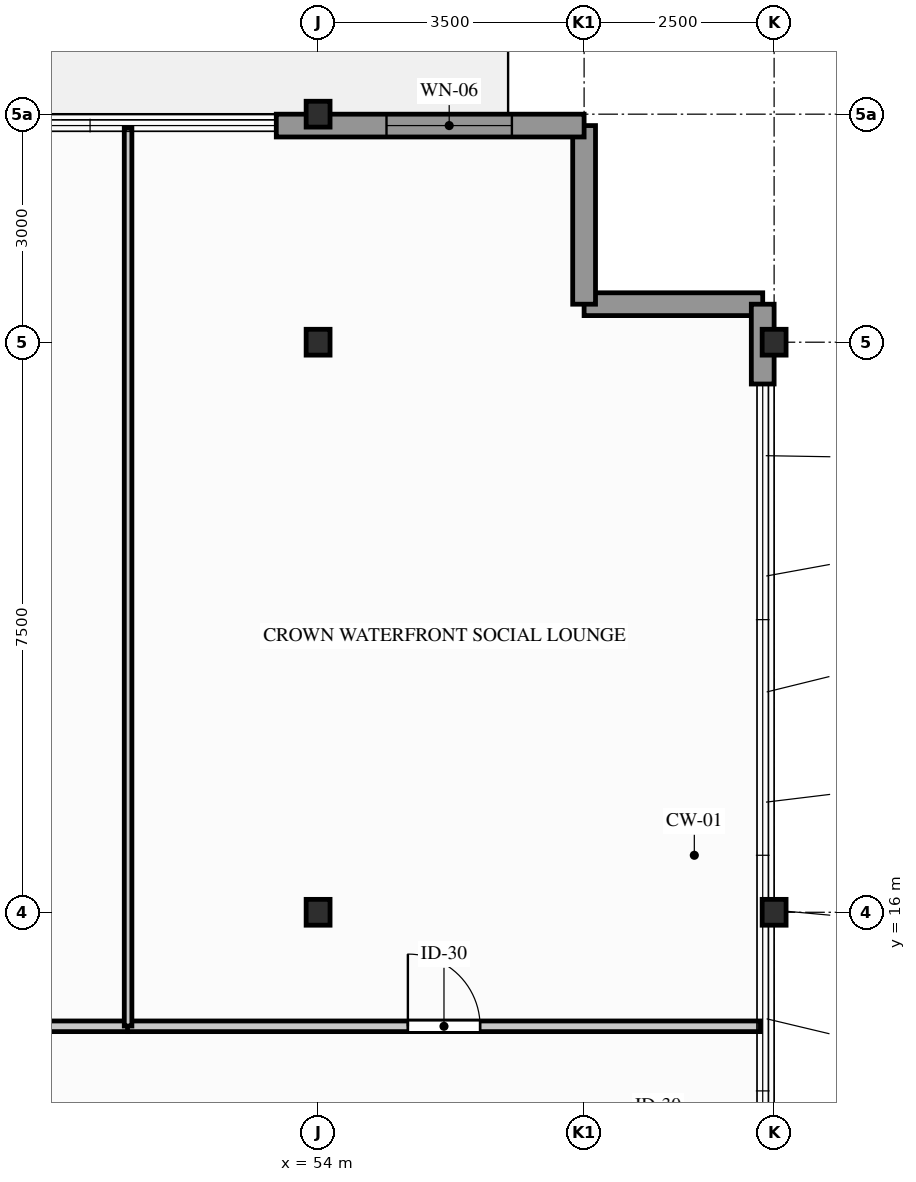
"""IFC4 building model, lengths in metres.
Left out: names, types, materials, properties, quantities, classifications, styles, units other than length and angle.
Written with IfcOpenShell. Run it as: python <this file> out.ifc"""

import sys

from ifc_helpers import new_model, si_unit, direction, frame, frame_2d, origin, origin_2d, place, context, subcontext, project, spatial, rectangle, i_section, extrude, element, fill, save


model = new_model("IFC4")
c1 = context("Model", 3, precision=1e-05, world=origin(), true_north=direction((0.0, 1.0)))
c2 = subcontext(c1, "Body", "Model", "MODEL_VIEW")
j1 = project(units=[si_unit("LENGTHUNIT", "METRE"), si_unit("PLANEANGLEUNIT", "RADIAN")], contexts=[c1])
p1 = place(None, origin())
s1 = spatial("IfcSite", under=j1, at=p1, CompositionType="ELEMENT")
p2 = place(p1, origin())
s2 = spatial("IfcBuilding", under=s1, at=p2, CompositionType="ELEMENT")
p3 = place(p2, frame((0.0, 0.0, 236.6)))
s3 = spatial("IfcBuildingStorey", under=s2, at=p3, CompositionType="ELEMENT", Elevation=236.6)
for number, where, z_axis, x_axis in (
    (1, (54.0, 16.0, 0.0), (0.0, 0.0, 1.0), (1.0, 0.0, 0.0)),
    (2, (54.0, 23.5, 0.0), (0.0, 0.0, 1.0), (1.0, 0.0, 0.0)),
    (3, (54.0, 26.5, 0.0), (0.0, 0.0, 1.0), (1.0, 0.0, 0.0)),
    (4, (60.0, 16.0, 0.0), (0.0, 0.0, 1.0), (1.0, 0.0, 0.0)),
    (5, (60.0, 23.5, 0.0), (0.0, 0.0, 1.0), (1.0, 0.0, 0.0)),
):
    element("IfcColumn", number, at=place(p3, frame(where, z_axis=z_axis, x_axis=x_axis)), inside=s3, PredefinedType="COLUMN", context=c2, shape_type="SweptSolid", body=[
        extrude(i_section(OverallWidth=0.314, OverallDepth=0.34, WebThickness=0.019, FlangeThickness=0.031, FilletRadius=0.015, at=origin_2d()), origin(), (0.0, 0.0, 1.0), 3.45),
    ])
for number, where, z_axis, x_axis in (
    (6, (59.85, 24.0, 0.0), (0.0, 0.0, 1.0), (-1.0, 0.0, 0.0)),
    (7, (57.5, 24.0, 0.0), (0.0, 0.0, 1.0), (0.0, 1.0, 0.0)),
):
    element("IfcWall", number, at=place(p3, frame(where, z_axis=z_axis, x_axis=x_axis)), inside=s3, PredefinedType="STANDARD", context=c2, shape_type="SweptSolid", body=[
        extrude(rectangle(XDim=2.35, YDim=0.3, at=frame_2d((1.175, 0.0))), origin(), (0.0, 0.0, 1.0), 3.2),
    ])
p4 = place(p3, frame((59.85, 22.95, 0.0), z_axis=(0.0, 0.0, 1.0), x_axis=(0.0, 1.0, 0.0)))
e8 = element("IfcWall", 8, at=p4, inside=s3, PredefinedType="STANDARD", context=c2, shape_type="SweptSolid", body=[
    extrude(rectangle(XDim=1.05, YDim=0.3, at=frame_2d((0.525, 0.0))), origin(), (0.0, 0.0, 1.0), 3.2),
])
p5 = place(p3, frame((53.45, 26.35, 0.0), z_axis=(0.0, 0.0, 1.0), x_axis=(1.0, 0.0, 0.0)))
e9 = element("IfcWall", 9, at=p5, inside=s3, PredefinedType="STANDARD", context=c2, shape_type="SweptSolid", body=[
    extrude(rectangle(XDim=4.05, YDim=0.3, at=frame_2d((2.025, 0.0))), origin(), (0.0, 0.0, 1.0), 3.2),
])
p6 = place(p5, frame((1.45, 0.0, 0.9)))
e10 = element("IfcOpeningElement", 10, at=p6, cuts=e9, PredefinedType="OPENING", context=c2, shape_type="SweptSolid", body=[
    extrude(rectangle(XDim=1.65, YDim=1.9, at=frame_2d((0.825, 0.95))), frame((0.0, 0.16, 0.0), z_axis=(0.0, -1.0, 0.0), x_axis=(1.0, 0.0, 0.0)), (0.0, 0.0, 1.0), 0.32),
])
p7 = place(p3, frame((40.493, 14.5, 0.0), z_axis=(0.0, 0.0, 1.0), x_axis=(1.0, 0.0, 0.0)))
e11 = element("IfcWall", 11, at=p7, inside=s3, PredefinedType="PARTITIONING", context=c2, shape_type="SweptSolid", body=[
    extrude(rectangle(XDim=11.019, YDim=0.14, at=frame_2d((5.509, 0.0))), origin(), (0.0, 0.0, 1.0), 2.563),
])
p8 = place(p7, frame((4.984, 0.0, 0.0)))
e12 = element("IfcOpeningElement", 12, at=p8, cuts=e11, PredefinedType="OPENING", context=c2, shape_type="SweptSolid", body=[
    extrude(rectangle(XDim=1.05, YDim=2.06, at=frame_2d((0.525, 1.03))), frame((0.0, 0.08, 0.0), z_axis=(0.0, -1.0, 0.0), x_axis=(1.0, 0.0, 0.0)), (0.0, 0.0, 1.0), 0.16),
])
p9 = place(p3, frame((51.493, 14.5, 0.0), z_axis=(0.0, 0.0, 1.0), x_axis=(1.0, 0.0, 0.0)))
e13 = element("IfcWall", 13, at=p9, inside=s3, PredefinedType="PARTITIONING", context=c2, shape_type="SweptSolid", body=[
    extrude(rectangle(XDim=8.327, YDim=0.14, at=frame_2d((4.164, 0.0))), origin(), (0.0, 0.0, 1.0), 2.563),
])
p10 = place(p9, frame((3.689, 0.0, 0.0)))
e14 = element("IfcOpeningElement", 14, at=p10, cuts=e13, PredefinedType="OPENING", context=c2, shape_type="SweptSolid", body=[
    extrude(rectangle(XDim=0.95, YDim=2.05, at=frame_2d((0.475, 1.025))), frame((0.0, 0.08, 0.0), z_axis=(0.0, -1.0, 0.0), x_axis=(1.0, 0.0, 0.0)), (0.0, 0.0, 1.0), 0.16),
])
p11 = place(p3, frame((51.5, 14.504, 0.0), z_axis=(0.0, 0.0, 1.0), x_axis=(0.0, 1.0, 0.0)))
e15 = element("IfcWall", 15, at=p11, inside=s3, PredefinedType="PARTITIONING", context=c2, shape_type="SweptSolid", body=[
    extrude(rectangle(XDim=11.816, YDim=0.1, at=frame_2d((5.908, 0.0))), origin(), (0.0, 0.0, 1.0), 2.563),
])
p12 = place(p6, origin())
e16 = element("IfcWindow", 16, at=p12, inside=s3, PartitioningType="SINGLE_PANEL", PredefinedType="WINDOW", context=c2, shape_type="SweptSolid", body=[
    extrude(rectangle(XDim=1.65, YDim=1.9, at=frame_2d((0.825, 0.95))), frame((0.0, 0.03, 0.0), z_axis=(0.0, -1.0, 0.0), x_axis=(1.0, 0.0, 0.0)), (0.0, 0.0, 1.0), 0.06),
])
fill(e10, e16)
p13 = place(p10, origin())
e17 = element("IfcDoor", 17, at=p13, inside=s3, OperationType="SINGLE_SWING_LEFT", PredefinedType="DOOR", context=c2, shape_type="SweptSolid", body=[
    extrude(rectangle(XDim=0.95, YDim=2.05, at=frame_2d((0.475, 1.025))), frame((0.0, 0.025, 0.0), z_axis=(0.0, -1.0, 0.0), x_axis=(1.0, 0.0, 0.0)), (0.0, 0.0, 1.0), 0.05),
])
fill(e14, e17)
save(model, sys.argv[1])
